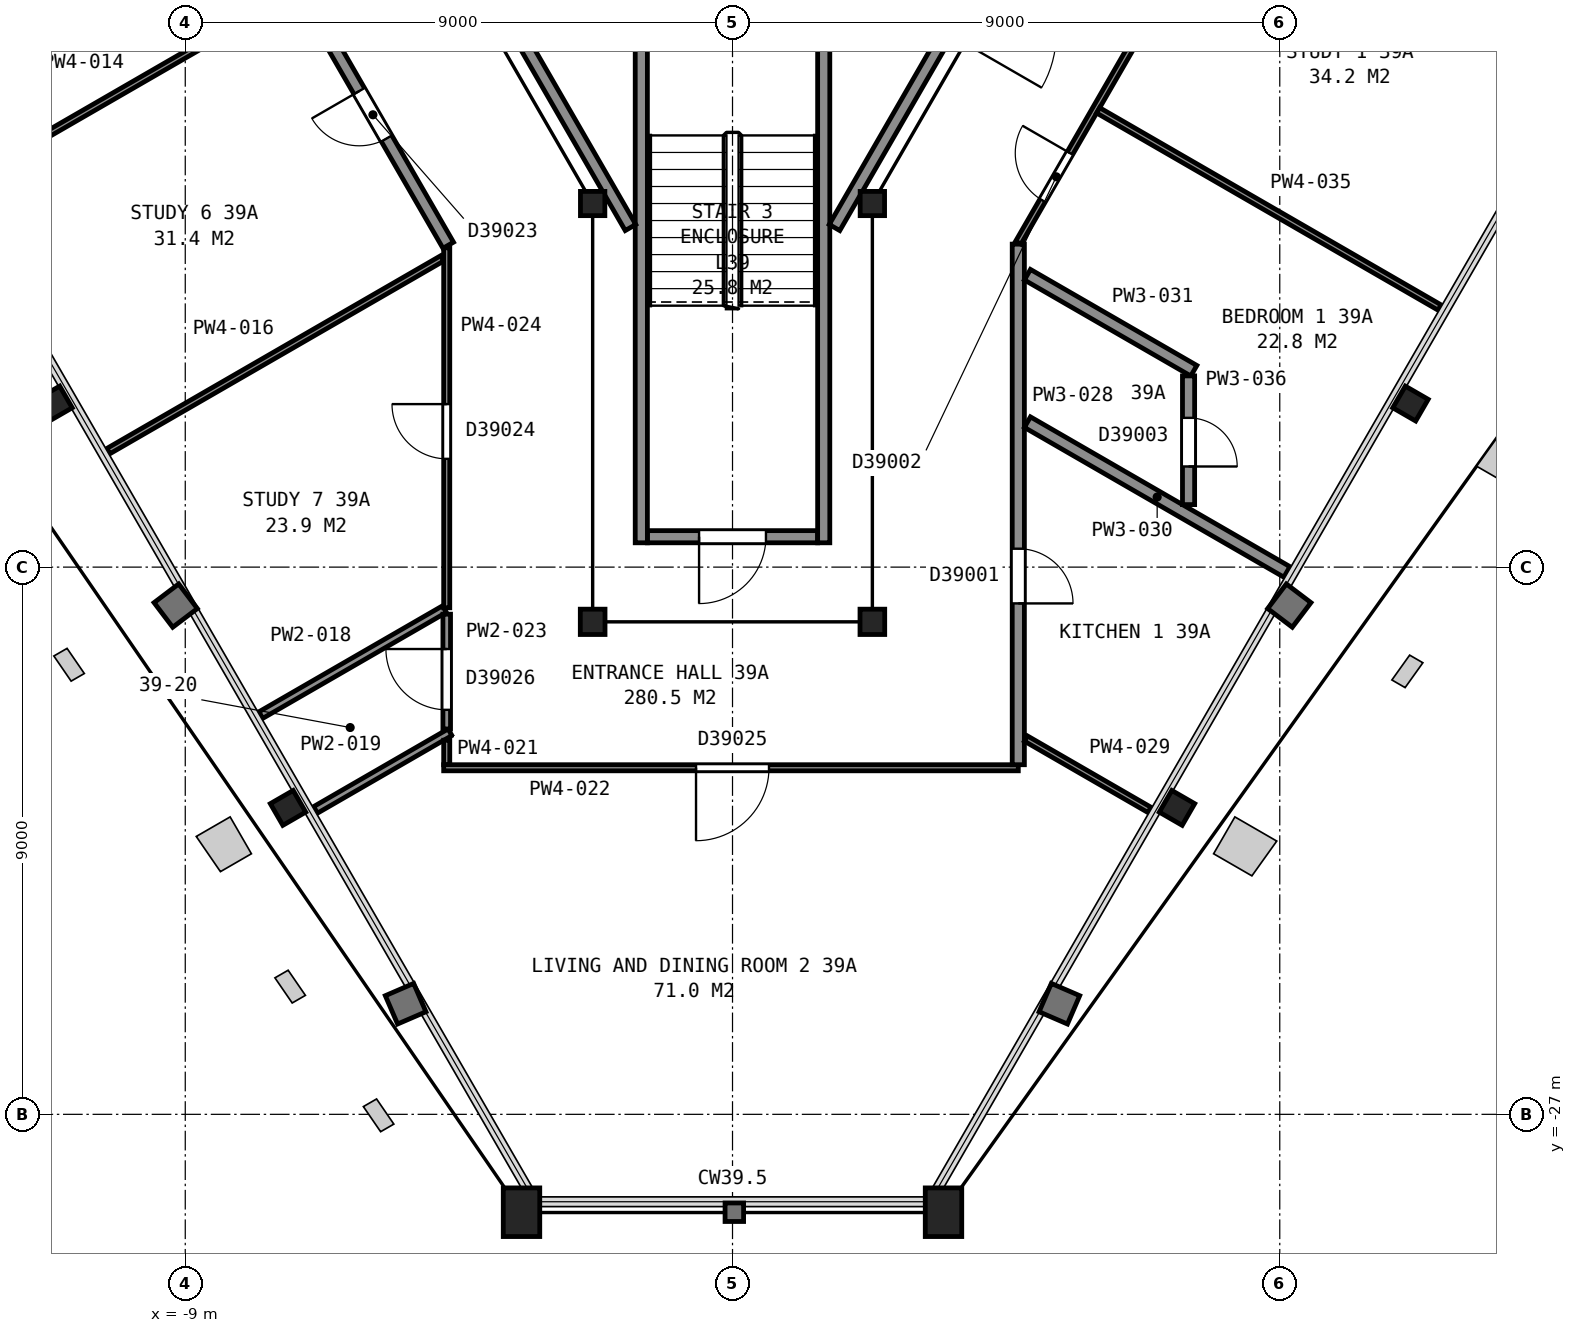
"""IFC4 building model, lengths in metres.
Left out: names, types, materials, properties, quantities, classifications, styles, units other than length and angle.
Written with IfcOpenShell. Run it as: python <this file> out.ifc"""

import sys

from ifc_helpers import new_model, si_unit, direction, frame, frame_2d, origin, origin_2d, place, context, subcontext, project, spatial, rectangle, hollow_rectangle, i_section, extrude, element, fill, save


model = new_model("IFC4")
c1 = context("Model", 3, precision=1e-05, world=origin(), true_north=direction((0.0, 1.0)))
c2 = subcontext(c1, "Body", "Model", "MODEL_VIEW")
j1 = project(units=[si_unit("LENGTHUNIT", "METRE"), si_unit("PLANEANGLEUNIT", "RADIAN")], contexts=[c1])
p1 = place(None, origin())
s1 = spatial("IfcSite", under=j1, at=p1, CompositionType="ELEMENT")
p2 = place(p1, origin())
s2 = spatial("IfcBuilding", under=s1, at=p2, CompositionType="ELEMENT")
p3 = place(p2, frame((0.0, 0.0, 159.9)))
s3 = spatial("IfcBuildingStorey", under=s2, at=p3, CompositionType="ELEMENT", Elevation=159.9)
p4 = place(p3, frame((-11.15, -15.31, 0.035), z_axis=(0.0, 0.0, 1.0), x_axis=(-0.5, 0.866025403784, 0.0)))
e1 = element("IfcColumn", 1, at=p4, inside=s3, PredefinedType="COLUMN", context=c2, shape_type="SweptSolid", body=[
    extrude(i_section(OverallWidth=0.411, OverallDepth=0.434, WebThickness=0.036, FlangeThickness=0.057, FilletRadius=0.015, at=origin_2d()), origin(), (0.0, 0.0, 1.0), 3.665),
])
p5 = place(p3, frame((-7.31, -21.96, 0.04), z_axis=(0.0, 0.0, 1.0), x_axis=(-0.5, 0.866025403784, 0.0)))
e2 = element("IfcColumn", 2, at=p5, inside=s3, PredefinedType="COLUMN", context=c2, shape_type="SweptSolid", body=[
    extrude(i_section(OverallWidth=0.411, OverallDepth=0.434, WebThickness=0.036, FlangeThickness=0.057, FilletRadius=0.015, at=origin_2d()), origin(), (0.0, 0.0, 1.0), 3.66),
])
for number, where, z_axis, x_axis in (
    (3, (-3.47, -28.61, 0.065), (0.0, 0.0, 1.0), (-1.0, 0.0, 0.0)),
    (4, (3.47, -28.61, 0.065), (0.0, 0.0, 1.0), (-1.0, 0.0, 0.0)),
):
    element("IfcColumn", number, at=place(p3, frame(where, z_axis=z_axis, x_axis=x_axis)), inside=s3, PredefinedType="COLUMN", context=c2, shape_type="SweptSolid", body=[
        extrude(hollow_rectangle(XDim=0.6, YDim=0.8, WallThickness=0.05, at=origin_2d()), origin(), (0.0, 0.0, 1.0), 3.635),
    ])
p6 = place(p3, frame((7.31, -21.96, 0.04), z_axis=(0.0, 0.0, 1.0), x_axis=(-0.5, -0.866025403784, 0.0)))
e5 = element("IfcColumn", 5, at=p6, inside=s3, PredefinedType="COLUMN", context=c2, shape_type="SweptSolid", body=[
    extrude(i_section(OverallWidth=0.411, OverallDepth=0.434, WebThickness=0.036, FlangeThickness=0.057, FilletRadius=0.015, at=origin_2d()), origin(), (0.0, 0.0, 1.0), 3.66),
])
p7 = place(p3, frame((11.15, -15.31, 0.035), z_axis=(0.0, 0.0, 1.0), x_axis=(-0.5, -0.866025403784, 0.0)))
e6 = element("IfcColumn", 6, at=p7, inside=s3, PredefinedType="COLUMN", context=c2, shape_type="SweptSolid", body=[
    extrude(i_section(OverallWidth=0.411, OverallDepth=0.434, WebThickness=0.036, FlangeThickness=0.057, FilletRadius=0.015, at=origin_2d()), origin(), (0.0, 0.0, 1.0), 3.665),
])
p8 = place(p3, frame((-2.3, -12.02, 0.0), z_axis=(0.0, 0.0, 1.0), x_axis=(1.0, 0.0, 0.0)))
e7 = element("IfcColumn", 7, at=p8, inside=s3, PredefinedType="COLUMN", context=c2, shape_type="SweptSolid", body=[
    extrude(i_section(OverallWidth=0.401, OverallDepth=0.399, WebThickness=0.025, FlangeThickness=0.04, FilletRadius=0.015, at=origin_2d()), origin(), (0.0, 0.0, 1.0), 3.7),
])
for number, where, z_axis, x_axis in (
    (8, (-2.3, -18.9, 0.0), (0.0, 0.0, 1.0), (-1.0, 0.0, 0.0)),
    (9, (2.3, -18.9, 0.0), (0.0, 0.0, 1.0), (-1.0, 0.0, 0.0)),
):
    element("IfcColumn", number, at=place(p3, frame(where, z_axis=z_axis, x_axis=x_axis)), inside=s3, PredefinedType="COLUMN", context=c2, shape_type="SweptSolid", body=[
        extrude(i_section(OverallWidth=0.406, OverallDepth=0.417, WebThickness=0.03, FlangeThickness=0.048, FilletRadius=0.015, at=origin_2d()), origin(), (0.0, 0.0, 1.0), 3.7),
    ])
p9 = place(p3, frame((2.3, -12.02, 0.0), z_axis=(0.0, 0.0, 1.0), x_axis=(1.0, 0.0, 0.0)))
e10 = element("IfcColumn", 10, at=p9, inside=s3, PredefinedType="COLUMN", context=c2, shape_type="SweptSolid", body=[
    extrude(i_section(OverallWidth=0.401, OverallDepth=0.399, WebThickness=0.025, FlangeThickness=0.04, FilletRadius=0.015, at=origin_2d()), origin(), (0.0, 0.0, 1.0), 3.7),
])
p10 = place(p3, frame((-1.4, -17.5, 0.0), z_axis=(0.0, 0.0, 1.0), x_axis=(1.0, 0.0, 0.0)))
e11 = element("IfcWall", 11, at=p10, inside=s3, PredefinedType="PARTITIONING", context=c2, shape_type="SweptSolid", body=[
    extrude(rectangle(XDim=2.8, YDim=0.2, at=frame_2d((1.4, 0.0))), origin(), (0.0, 0.0, 1.0), 3.45),
])
p11 = place(p10, frame((0.85, 0.0, 0.0)))
e12 = element("IfcOpeningElement", 12, at=p11, cuts=e11, PredefinedType="OPENING", context=c2, shape_type="SweptSolid", body=[
    extrude(rectangle(XDim=1.1, YDim=2.1, at=frame_2d((0.55, 1.05))), frame((0.0, 0.11, 0.0), z_axis=(0.0, -1.0, 0.0), x_axis=(1.0, 0.0, 0.0)), (0.0, 0.0, 1.0), 0.22),
])
for number, where, z_axis, x_axis in (
    (13, (1.5, -8.0, 0.0), (0.0, 0.0, 1.0), (0.0, -1.0, 0.0)),
    (14, (-1.5, -8.0, 0.0), (0.0, 0.0, 1.0), (0.0, -1.0, 0.0)),
):
    element("IfcWall", number, at=place(p3, frame(where, z_axis=z_axis, x_axis=x_axis)), inside=s3, PredefinedType="PARTITIONING", context=c2, shape_type="SweptSolid", body=[
        extrude(rectangle(XDim=9.6, YDim=0.2, at=frame_2d((4.8, 0.0))), origin(), (0.0, 0.0, 1.0), 3.45),
    ])
p12 = place(p3, frame((-4.655, -7.257, 0.0), z_axis=(0.0, 0.0, 1.0), x_axis=(0.499966124405, -0.866044960985, 0.0)))
e15 = element("IfcWall", 15, at=p12, inside=s3, PredefinedType="PARTITIONING", context=c2, shape_type="SweptSolid", body=[
    extrude(rectangle(XDim=5.956, YDim=0.2, at=frame_2d((2.978, 0.0))), origin(), (0.0, 0.0, 1.0), 3.45),
])
p13 = place(p3, frame((1.677, -12.415, 0.0), z_axis=(0.0, 0.0, 1.0), x_axis=(0.500054337157, 0.865994029939, 0.0)))
e16 = element("IfcWall", 16, at=p13, inside=s3, PredefinedType="PARTITIONING", context=c2, shape_type="SweptSolid", body=[
    extrude(rectangle(XDim=6.177, YDim=0.2, at=frame_2d((3.088, 0.0))), origin(), (0.0, 0.0, 1.0), 3.45),
])
p14 = place(p13, frame((3.695, 0.0, 0.0)))
e17 = element("IfcOpeningElement", 17, at=p14, cuts=e16, PredefinedType="OPENING", context=c2, shape_type="SweptSolid", body=[
    extrude(rectangle(XDim=1.8, YDim=2.1, at=frame_2d((0.9, 1.05))), frame((0.0, 0.11, 0.0), z_axis=(0.0, -1.0, 0.0), x_axis=(1.0, 0.0, 0.0)), (0.0, 0.0, 1.0), 0.22),
])
p15 = place(p3, frame((-4.675, -12.706, 0.0), z_axis=(0.0, 0.0, 1.0), x_axis=(-0.499972470324, 0.866041297467, 0.0)))
e18 = element("IfcWall", 18, at=p15, inside=s3, PredefinedType="PARTITIONING", context=c2, shape_type="SweptSolid", body=[
    extrude(rectangle(XDim=17.385, YDim=0.2, at=frame_2d((8.692, 0.0))), origin(), (0.0, 0.0, 1.0), 2.713),
])
p16 = place(p15, frame((15.435, 0.0, 0.0)))
e19 = element("IfcOpeningElement", 19, at=p16, cuts=e18, PredefinedType="OPENING", context=c2, shape_type="SweptSolid", body=[
    extrude(rectangle(XDim=0.9, YDim=2.1, at=frame_2d((0.45, 1.05))), frame((0.0, 0.11, 0.0), z_axis=(0.0, -1.0, 0.0), x_axis=(1.0, 0.0, 0.0)), (0.0, 0.0, 1.0), 0.22),
])
p17 = place(p15, frame((12.835, 0.0, 0.0)))
e20 = element("IfcOpeningElement", 20, at=p17, cuts=e18, PredefinedType="OPENING", context=c2, shape_type="SweptSolid", body=[
    extrude(rectangle(XDim=0.9, YDim=2.1, at=frame_2d((0.45, 1.05))), frame((0.0, 0.11, 0.0), z_axis=(0.0, -1.0, 0.0), x_axis=(1.0, 0.0, 0.0)), (0.0, 0.0, 1.0), 0.22),
])
p18 = place(p15, frame((6.941, 0.0, 0.0)))
e21 = element("IfcOpeningElement", 21, at=p18, cuts=e18, PredefinedType="OPENING", context=c2, shape_type="SweptSolid", body=[
    extrude(rectangle(XDim=0.9, YDim=2.1, at=frame_2d((0.45, 1.05))), frame((0.0, 0.11, 0.0), z_axis=(0.0, -1.0, 0.0), x_axis=(1.0, 0.0, 0.0)), (0.0, 0.0, 1.0), 0.22),
])
p19 = place(p15, frame((2.028, 0.0, 0.0)))
e22 = element("IfcOpeningElement", 22, at=p19, cuts=e18, PredefinedType="OPENING", context=c2, shape_type="SweptSolid", body=[
    extrude(rectangle(XDim=0.9, YDim=2.1, at=frame_2d((0.45, 1.05))), frame((0.0, 0.11, 0.0), z_axis=(0.0, -1.0, 0.0), x_axis=(1.0, 0.0, 0.0)), (0.0, 0.0, 1.0), 0.22),
])
p20 = place(p3, frame((-12.772, -11.749, 0.0), z_axis=(0.0, 0.0, 1.0), x_axis=(0.866026229868, 0.499998569178, 0.0)))
e23 = element("IfcWall", 23, at=p20, inside=s3, PredefinedType="PARTITIONING", context=c2, shape_type="SweptSolid", body=[
    extrude(rectangle(XDim=6.429, YDim=0.1, at=frame_2d((3.215, 0.0))), origin(), (0.0, 0.0, 1.0), 2.713),
])
p21 = place(p3, frame((-10.264, -16.092, 0.0), z_axis=(0.0, 0.0, 1.0), x_axis=(0.86602074738, 0.500008065043, 0.0)))
e24 = element("IfcWall", 24, at=p21, inside=s3, PredefinedType="PARTITIONING", context=c2, shape_type="SweptSolid", body=[
    extrude(rectangle(XDim=6.339, YDim=0.1, at=frame_2d((3.169, 0.0))), origin(), (0.0, 0.0, 1.0), 2.713),
])
p22 = place(p3, frame((-7.758, -20.434, 0.0), z_axis=(0.0, 0.0, 1.0), x_axis=(0.866090019653, 0.499888065328, 0.0)))
e25 = element("IfcWall", 25, at=p22, inside=s3, PredefinedType="PARTITIONING", context=c2, shape_type="SweptSolid", body=[
    extrude(rectangle(XDim=3.488, YDim=0.125, at=frame_2d((1.744, 0.0))), origin(), (0.0, 0.0, 1.0), 2.713),
])
p23 = place(p3, frame((-6.858, -21.993, 0.0), z_axis=(0.0, 0.0, 1.0), x_axis=(0.865992952931, 0.500056202316, 0.0)))
e26 = element("IfcWall", 26, at=p23, inside=s3, PredefinedType="PARTITIONING", context=c2, shape_type="SweptSolid", body=[
    extrude(rectangle(XDim=2.554, YDim=0.125, at=frame_2d((1.277, 0.0))), origin(), (0.0, 0.0, 1.0), 2.713),
])
p24 = place(p3, frame((-4.7, -21.25, 0.0), z_axis=(0.0, 0.0, 1.0), x_axis=(0.0, 1.0, 0.0)))
e27 = element("IfcWall", 27, at=p24, inside=s3, PredefinedType="PARTITIONING", context=c2, shape_type="SweptSolid", body=[
    extrude(rectangle(XDim=0.403, YDim=0.1, at=frame_2d((0.202, 0.0))), origin(), (0.0, 0.0, 1.0), 2.713),
])
p25 = place(p3, frame((4.7, -21.3, 0.0), z_axis=(0.0, 0.0, 1.0), x_axis=(-1.0, 0.0, 0.0)))
e28 = element("IfcWall", 28, at=p25, inside=s3, PredefinedType="PARTITIONING", context=c2, shape_type="SweptSolid", body=[
    extrude(rectangle(XDim=9.45, YDim=0.1, at=frame_2d((4.725, 0.0))), origin(), (0.0, 0.0, 1.0), 2.713),
])
p26 = place(p25, frame((4.1, 0.0, 0.0)))
e29 = element("IfcOpeningElement", 29, at=p26, cuts=e28, PredefinedType="OPENING", context=c2, shape_type="SweptSolid", body=[
    extrude(rectangle(XDim=1.2, YDim=2.1, at=frame_2d((0.6, 1.05))), frame((0.0, 0.06, 0.0), z_axis=(0.0, -1.0, 0.0), x_axis=(1.0, 0.0, 0.0)), (0.0, 0.0, 1.0), 0.12),
])
p27 = place(p3, frame((-4.7, -18.774, 0.0), z_axis=(0.0, 0.0, 1.0), x_axis=(0.0, -1.0, 0.0)))
e30 = element("IfcWall", 30, at=p27, inside=s3, PredefinedType="PARTITIONING", context=c2, shape_type="SweptSolid", body=[
    extrude(rectangle(XDim=1.888, YDim=0.125, at=frame_2d((0.944, 0.0))), origin(), (0.0, 0.0, 1.0), 2.713),
])
p28 = place(p27, frame((0.573, 0.0, 0.0)))
e31 = element("IfcOpeningElement", 31, at=p28, cuts=e30, PredefinedType="OPENING", context=c2, shape_type="SweptSolid", body=[
    extrude(rectangle(XDim=1.0, YDim=2.1, at=frame_2d((0.5, 1.05))), frame((0.0, 0.073, 0.0), z_axis=(0.0, -1.0, 0.0), x_axis=(1.0, 0.0, 0.0)), (0.0, 0.0, 1.0), 0.145),
])
p29 = place(p3, frame((-4.7, -18.669, 0.0), z_axis=(0.0, 0.0, 1.0), x_axis=(0.0, 1.0, 0.0)))
e32 = element("IfcWall", 32, at=p29, inside=s3, PredefinedType="PARTITIONING", context=c2, shape_type="SweptSolid", body=[
    extrude(rectangle(XDim=5.921, YDim=0.1, at=frame_2d((2.96, 0.0))), origin(), (0.0, 0.0, 1.0), 2.713),
])
p30 = place(p29, frame((2.45, 0.0, 0.0)))
e33 = element("IfcOpeningElement", 33, at=p30, cuts=e32, PredefinedType="OPENING", context=c2, shape_type="SweptSolid", body=[
    extrude(rectangle(XDim=0.9, YDim=2.1, at=frame_2d((0.45, 1.05))), frame((0.0, 0.06, 0.0), z_axis=(0.0, -1.0, 0.0), x_axis=(1.0, 0.0, 0.0)), (0.0, 0.0, 1.0), 0.12),
])
p31 = place(p3, frame((4.7, -12.688, 0.0), z_axis=(0.0, 0.0, 1.0), x_axis=(0.0, -1.0, 0.0)))
e34 = element("IfcWall", 34, at=p31, inside=s3, PredefinedType="PARTITIONING", context=c2, shape_type="SweptSolid", body=[
    extrude(rectangle(XDim=8.562, YDim=0.2, at=frame_2d((4.281, 0.0))), origin(), (0.0, 0.0, 1.0), 2.713),
])
p32 = place(p31, frame((5.009, 0.0, 0.0)))
e35 = element("IfcOpeningElement", 35, at=p32, cuts=e34, PredefinedType="OPENING", context=c2, shape_type="SweptSolid", body=[
    extrude(rectangle(XDim=0.9, YDim=2.1, at=frame_2d((0.45, 1.05))), frame((0.0, 0.11, 0.0), z_axis=(0.0, -1.0, 0.0), x_axis=(1.0, 0.0, 0.0)), (0.0, 0.0, 1.0), 0.22),
])
p33 = place(p3, frame((4.825, -20.819, 0.0), z_axis=(0.0, 0.0, 1.0), x_axis=(0.865981189106, -0.500076574252, 0.0)))
e36 = element("IfcWall", 36, at=p33, inside=s3, PredefinedType="PARTITIONING", context=c2, shape_type="SweptSolid", body=[
    extrude(rectangle(XDim=2.347, YDim=0.1, at=frame_2d((1.174, 0.0))), origin(), (0.0, 0.0, 1.0), 2.713),
])
p34 = place(p3, frame((4.85, -15.615, 0.0), z_axis=(0.0, 0.0, 1.0), x_axis=(0.866057699548, -0.499944057923, 0.0)))
e37 = element("IfcWall", 37, at=p34, inside=s3, PredefinedType="PARTITIONING", context=c2, shape_type="SweptSolid", body=[
    extrude(rectangle(XDim=4.927, YDim=0.2, at=frame_2d((2.464, 0.0))), origin(), (0.0, 0.0, 1.0), 2.713),
])
p35 = place(p3, frame((4.85, -13.191, 0.0), z_axis=(0.0, 0.0, 1.0), x_axis=(0.866109679077, -0.499854002494, 0.0)))
e38 = element("IfcWall", 38, at=p35, inside=s3, PredefinedType="PARTITIONING", context=c2, shape_type="SweptSolid", body=[
    extrude(rectangle(XDim=3.16, YDim=0.2, at=frame_2d((1.58, 0.0))), origin(), (0.0, 0.0, 1.0), 2.713),
])
p36 = place(p3, frame((13.342, 2.306, 0.0), z_axis=(0.0, 0.0, 1.0), x_axis=(-0.49997635812, -0.866039053, 0.0)))
e39 = element("IfcWall", 39, at=p36, inside=s3, PredefinedType="PARTITIONING", context=c2, shape_type="SweptSolid", body=[
    extrude(rectangle(XDim=17.285, YDim=0.1, at=frame_2d((8.643, 0.0))), origin(), (0.0, 0.0, 1.0), 2.713),
])
p37 = place(p36, frame((15.585, 0.0, 0.0)))
e40 = element("IfcOpeningElement", 40, at=p37, cuts=e39, PredefinedType="OPENING", context=c2, shape_type="SweptSolid", body=[
    extrude(rectangle(XDim=0.9, YDim=2.1, at=frame_2d((0.45, 1.05))), frame((0.0, 0.06, 0.0), z_axis=(0.0, -1.0, 0.0), x_axis=(1.0, 0.0, 0.0)), (0.0, 0.0, 1.0), 0.12),
])
p38 = place(p36, frame((11.595, 0.0, 0.0)))
e41 = element("IfcOpeningElement", 41, at=p38, cuts=e39, PredefinedType="OPENING", context=c2, shape_type="SweptSolid", body=[
    extrude(rectangle(XDim=0.9, YDim=2.1, at=frame_2d((0.45, 1.05))), frame((0.0, 0.06, 0.0), z_axis=(0.0, -1.0, 0.0), x_axis=(1.0, 0.0, 0.0)), (0.0, 0.0, 1.0), 0.12),
])
p39 = place(p36, frame((6.171, 0.0, 0.0)))
e42 = element("IfcOpeningElement", 42, at=p39, cuts=e39, PredefinedType="OPENING", context=c2, shape_type="SweptSolid", body=[
    extrude(rectangle(XDim=0.9, YDim=2.1, at=frame_2d((0.45, 1.05))), frame((0.0, 0.06, 0.0), z_axis=(0.0, -1.0, 0.0), x_axis=(1.0, 0.0, 0.0)), (0.0, 0.0, 1.0), 0.12),
])
p40 = place(p3, frame((6.013, -10.488, 0.0), z_axis=(0.0, 0.0, 1.0), x_axis=(0.86599118531, -0.500059263454, 0.0)))
e43 = element("IfcWall", 43, at=p40, inside=s3, PredefinedType="PARTITIONING", context=c2, shape_type="SweptSolid", body=[
    extrude(rectangle(XDim=6.484, YDim=0.1, at=frame_2d((3.242, 0.0))), origin(), (0.0, 0.0, 1.0), 2.713),
])
p41 = place(p3, frame((7.5, -16.972, 0.0), z_axis=(0.0, 0.0, 1.0), x_axis=(0.0, 1.0, 0.0)))
e44 = element("IfcWall", 44, at=p41, inside=s3, PredefinedType="PARTITIONING", context=c2, shape_type="SweptSolid", body=[
    extrude(rectangle(XDim=2.117, YDim=0.2, at=frame_2d((1.059, 0.0))), origin(), (0.0, 0.0, 1.0), 2.713),
])
p42 = place(p41, frame((0.627, 0.0, 0.0)))
e45 = element("IfcOpeningElement", 45, at=p42, cuts=e44, PredefinedType="OPENING", context=c2, shape_type="SweptSolid", body=[
    extrude(rectangle(XDim=0.8, YDim=2.1, at=frame_2d((0.4, 1.05))), frame((0.0, 0.11, 0.0), z_axis=(0.0, -1.0, 0.0), x_axis=(1.0, 0.0, 0.0)), (0.0, 0.0, 1.0), 0.22),
])
p43 = place(p11, origin())
e46 = element("IfcDoor", 46, at=p43, inside=s3, OperationType="SINGLE_SWING_LEFT", PredefinedType="DOOR", context=c2, shape_type="SweptSolid", body=[
    extrude(rectangle(XDim=1.1, YDim=2.1, at=frame_2d((0.55, 1.05))), frame((0.0, 0.025, 0.0), z_axis=(0.0, -1.0, 0.0), x_axis=(1.0, 0.0, 0.0)), (0.0, 0.0, 1.0), 0.05),
])
fill(e12, e46)
p44 = place(p19, origin())
e47 = element("IfcDoor", 47, at=p44, inside=s3, OperationType="SINGLE_SWING_RIGHT", PredefinedType="DOOR", context=c2, shape_type="SweptSolid", body=[
    extrude(rectangle(XDim=0.9, YDim=2.1, at=frame_2d((0.45, 1.05))), frame((0.0, 0.025, 0.0), z_axis=(0.0, -1.0, 0.0), x_axis=(1.0, 0.0, 0.0)), (0.0, 0.0, 1.0), 0.05),
])
fill(e22, e47)
p45 = place(p26, origin())
e48 = element("IfcDoor", 48, at=p45, inside=s3, OperationType="SINGLE_SWING_RIGHT", PredefinedType="DOOR", context=c2, shape_type="SweptSolid", body=[
    extrude(rectangle(XDim=1.2, YDim=2.1, at=frame_2d((0.6, 1.05))), frame((0.0, 0.025, 0.0), z_axis=(0.0, -1.0, 0.0), x_axis=(1.0, 0.0, 0.0)), (0.0, 0.0, 1.0), 0.05),
])
fill(e29, e48)
p46 = place(p28, origin())
e49 = element("IfcDoor", 49, at=p46, inside=s3, OperationType="SINGLE_SWING_LEFT", PredefinedType="DOOR", context=c2, shape_type="SweptSolid", body=[
    extrude(rectangle(XDim=1.0, YDim=2.1, at=frame_2d((0.5, 1.05))), frame((0.0, 0.025, 0.0), z_axis=(0.0, -1.0, 0.0), x_axis=(1.0, 0.0, 0.0)), (0.0, 0.0, 1.0), 0.05),
])
fill(e31, e49)
p47 = place(p30, origin())
e50 = element("IfcDoor", 50, at=p47, inside=s3, OperationType="SINGLE_SWING_RIGHT", PredefinedType="DOOR", context=c2, shape_type="SweptSolid", body=[
    extrude(rectangle(XDim=0.9, YDim=2.1, at=frame_2d((0.45, 1.05))), frame((0.0, 0.025, 0.0), z_axis=(0.0, -1.0, 0.0), x_axis=(1.0, 0.0, 0.0)), (0.0, 0.0, 1.0), 0.05),
])
fill(e33, e50)
p48 = place(p32, origin())
e51 = element("IfcDoor", 51, at=p48, inside=s3, OperationType="SINGLE_SWING_RIGHT", PredefinedType="DOOR", context=c2, shape_type="SweptSolid", body=[
    extrude(rectangle(XDim=0.9, YDim=2.1, at=frame_2d((0.45, 1.05))), frame((0.0, 0.025, 0.0), z_axis=(0.0, -1.0, 0.0), x_axis=(1.0, 0.0, 0.0)), (0.0, 0.0, 1.0), 0.05),
])
fill(e35, e51)
p49 = place(p37, origin())
e52 = element("IfcDoor", 52, at=p49, inside=s3, OperationType="SINGLE_SWING_LEFT", PredefinedType="DOOR", context=c2, shape_type="SweptSolid", body=[
    extrude(rectangle(XDim=0.9, YDim=2.1, at=frame_2d((0.45, 1.05))), frame((0.0, 0.025, 0.0), z_axis=(0.0, -1.0, 0.0), x_axis=(1.0, 0.0, 0.0)), (0.0, 0.0, 1.0), 0.05),
])
fill(e40, e52)
p50 = place(p42, origin())
e53 = element("IfcDoor", 53, at=p50, inside=s3, OperationType="SINGLE_SWING_LEFT", PredefinedType="DOOR", context=c2, shape_type="SweptSolid", body=[
    extrude(rectangle(XDim=0.8, YDim=2.1, at=frame_2d((0.4, 1.05))), frame((0.0, 0.025, 0.0), z_axis=(0.0, -1.0, 0.0), x_axis=(1.0, 0.0, 0.0)), (0.0, 0.0, 1.0), 0.05),
])
fill(e45, e53)
save(model, sys.argv[1])
